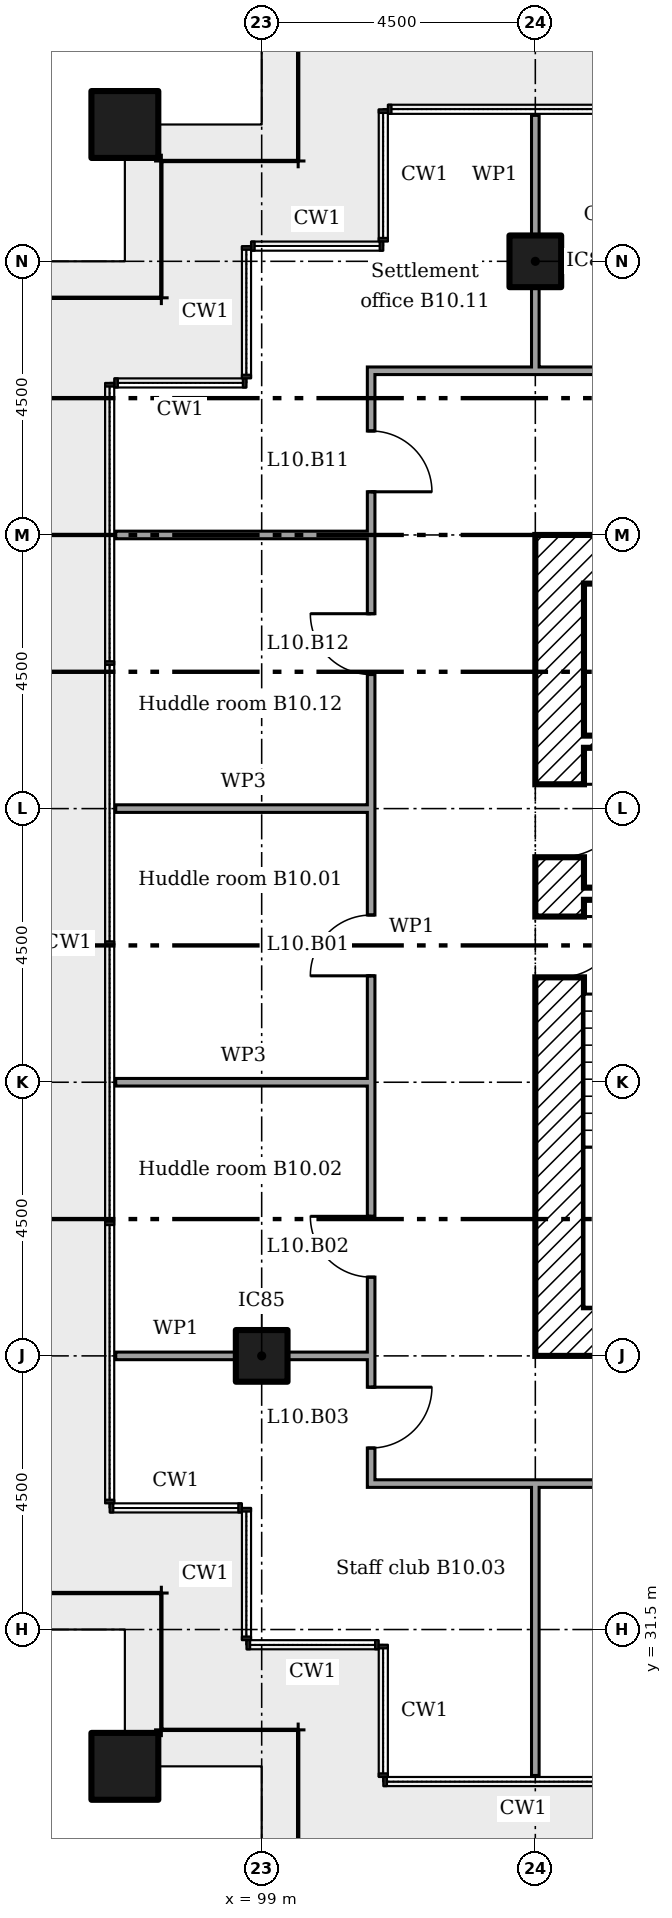
"""IFC4 building model, lengths in metres.
Left out: names, types, materials, properties, quantities, classifications, styles, units other than length and angle.
Written with IfcOpenShell. Run it as: python <this file> out.ifc"""

import sys

from ifc_helpers import new_model, si_unit, direction, frame, frame_2d, origin, origin_2d, place, context, subcontext, project, spatial, rectangle, extrude, element, fill, save


model = new_model("IFC4")
c1 = context("Model", 3, precision=1e-05, world=origin(), true_north=direction((0.0, 1.0)))
c2 = subcontext(c1, "Body", "Model", "MODEL_VIEW")
j1 = project(units=[si_unit("LENGTHUNIT", "METRE"), si_unit("PLANEANGLEUNIT", "RADIAN")], contexts=[c1])
p1 = place(None, origin())
s1 = spatial("IfcSite", under=j1, at=p1, CompositionType="ELEMENT")
p2 = place(p1, origin())
s2 = spatial("IfcBuilding", under=s1, at=p2, CompositionType="ELEMENT")
p3 = place(p2, frame((0.0, 0.0, 47.4)))
s3 = spatial("IfcBuildingStorey", under=s2, at=p3, CompositionType="ELEMENT", Elevation=47.4)
for number, where in (
    (1, (96.75, 56.25, 0.0)),
    (2, (96.75, 29.25, 0.0)),
):
    element("IfcColumn", number, at=place(p3, frame(where)), inside=s3, PredefinedType="COLUMN", context=c2, shape_type="SweptSolid", body=[
        extrude(rectangle(XDim=1.1, YDim=1.1, at=origin_2d()), origin(), (0.0, 0.0, 1.0), 3.6),
    ])
for number, where in (
    (3, (99.0, 36.0, 0.0)),
    (4, (103.5, 54.0, 0.0)),
):
    element("IfcColumn", number, at=place(p3, frame(where)), inside=s3, PredefinedType="COLUMN", context=c2, shape_type="SweptSolid", body=[
        extrude(rectangle(XDim=0.85, YDim=0.85, at=origin_2d()), origin(), (0.0, 0.0, 1.0), 3.6),
    ])
for number, where in (
    (5, (104.3, 49.1, 0.0)),
    (6, (104.3, 36.4, 0.0)),
):
    element("IfcWall", number, at=place(p3, frame(where)), inside=s3, PredefinedType="SHEAR", context=c2, shape_type="SweptSolid", body=[
        extrude(rectangle(XDim=11.9, YDim=0.8, at=frame_2d((5.95, 0.0))), origin(), (0.0, 0.0, 1.0), 3.35),
    ])
p4 = place(p3, frame((103.9, 36.0, 0.0), z_axis=(0.0, 0.0, 1.0), x_axis=(0.0, 1.0, 0.0)))
e7 = element("IfcWall", 7, at=p4, inside=s3, PredefinedType="SHEAR", context=c2, shape_type="SweptSolid", body=[
    extrude(rectangle(XDim=13.5, YDim=0.8, at=frame_2d((6.75, 0.0))), origin(), (0.0, 0.0, 1.0), 3.35),
])
p5 = place(p4, frame((8.2, 0.0, 0.0)))
e8 = element("IfcOpeningElement", 8, at=p5, cuts=e7, PredefinedType="OPENING", context=c2, shape_type="SweptSolid", body=[
    extrude(rectangle(XDim=1.2, YDim=2.1, at=frame_2d((0.6, 1.05))), frame((0.0, 0.41, 0.0), z_axis=(0.0, -1.0, 0.0), x_axis=(1.0, 0.0, 0.0)), (0.0, 0.0, 1.0), 0.82),
])
p6 = place(p4, frame((6.225, 0.0, 0.0)))
e9 = element("IfcOpeningElement", 9, at=p6, cuts=e7, PredefinedType="OPENING", context=c2, shape_type="SweptSolid", body=[
    extrude(rectangle(XDim=1.0, YDim=2.1, at=frame_2d((0.5, 1.05))), frame((0.0, 0.41, 0.0), z_axis=(0.0, -1.0, 0.0), x_axis=(1.0, 0.0, 0.0)), (0.0, 0.0, 1.0), 0.82),
])
p7 = place(p3, frame((104.3, 46.1, 0.0)))
e10 = element("IfcWall", 10, at=p7, inside=s3, PredefinedType="SHEAR", context=c2, shape_type="SweptSolid", body=[
    extrude(rectangle(XDim=3.033, YDim=0.2, at=frame_2d((1.517, 0.0))), origin(), (0.0, 0.0, 1.0), 3.35),
])
p8 = place(p7, frame((1.217, 0.0, 0.0)))
e11 = element("IfcOpeningElement", 11, at=p8, cuts=e10, PredefinedType="OPENING", context=c2, shape_type="SweptSolid", body=[
    extrude(rectangle(XDim=0.9, YDim=2.1, at=frame_2d((0.45, 1.05))), frame((0.0, 0.11, 0.0), z_axis=(0.0, -1.0, 0.0), x_axis=(1.0, 0.0, 0.0)), (0.0, 0.0, 1.0), 0.22),
])
p9 = place(p3, frame((104.3, 43.6, 0.0)))
e12 = element("IfcWall", 12, at=p9, inside=s3, PredefinedType="SHEAR", context=c2, shape_type="SweptSolid", body=[
    extrude(rectangle(XDim=2.7, YDim=0.2, at=frame_2d((1.35, 0.0))), origin(), (0.0, 0.0, 1.0), 3.35),
])
p10 = place(p9, frame((0.95, 0.0, 0.0)))
e13 = element("IfcOpeningElement", 13, at=p10, cuts=e12, PredefinedType="OPENING", context=c2, shape_type="SweptSolid", body=[
    extrude(rectangle(XDim=1.0, YDim=2.1, at=frame_2d((0.5, 1.05))), frame((0.0, 0.11, 0.0), z_axis=(0.0, -1.0, 0.0), x_axis=(1.0, 0.0, 0.0)), (0.0, 0.0, 1.0), 0.22),
])
p11 = place(p3, frame((100.738, 33.9, 0.0)))
e14 = element("IfcWall", 14, at=p11, inside=s3, PredefinedType="PARTITIONING", context=c2, shape_type="SweptSolid", body=[
    extrude(rectangle(XDim=12.575, YDim=0.125, at=frame_2d((6.288, 0.0))), origin(), (0.0, 0.0, 1.0), 3.45),
])
p12 = place(p11, frame((7.137, 0.0, 0.0)))
e15 = element("IfcOpeningElement", 15, at=p12, cuts=e14, PredefinedType="OPENING", context=c2, shape_type="SweptSolid", body=[
    extrude(rectangle(XDim=1.0, YDim=2.1, at=frame_2d((0.5, 1.05))), frame((0.0, 0.073, 0.0), z_axis=(0.0, -1.0, 0.0), x_axis=(1.0, 0.0, 0.0)), (0.0, 0.0, 1.0), 0.145),
])
p13 = place(p3, frame((96.6, 36.0, 0.0)))
e16 = element("IfcWall", 16, at=p13, inside=s3, PredefinedType="PARTITIONING", context=c2, shape_type="SweptSolid", body=[
    extrude(rectangle(XDim=1.975, YDim=0.125, at=frame_2d((0.987, 0.0))), origin(), (0.0, 0.0, 1.0), 2.842),
])
p14 = place(p3, frame((99.425, 36.0, 0.0)))
e17 = element("IfcWall", 17, at=p14, inside=s3, PredefinedType="PARTITIONING", context=c2, shape_type="SweptSolid", body=[
    extrude(rectangle(XDim=1.375, YDim=0.125, at=frame_2d((0.688, 0.0))), origin(), (0.0, 0.0, 1.0), 2.842),
])
for number, where in (
    (18, (96.6, 40.5, 0.0)),
    (19, (96.6, 45.0, 0.0)),
):
    element("IfcWall", number, at=place(p3, frame(where)), inside=s3, PredefinedType="MOVABLE", context=c2, shape_type="SweptSolid", body=[
        extrude(rectangle(XDim=4.2, YDim=0.125, at=frame_2d((2.1, 0.0))), origin(), (0.0, 0.0, 1.0), 2.851),
    ])
p15 = place(p3, frame((96.6, 49.5, 0.0)))
e20 = element("IfcWall", 20, at=p15, inside=s3, PredefinedType="PARTITIONING", context=c2, shape_type="SweptSolid", body=[
    extrude(rectangle(XDim=4.2, YDim=0.125, at=frame_2d((2.1, 0.0))), origin(), (0.0, 0.0, 1.0), 2.851),
])
p16 = place(p3, frame((100.738, 52.2, 0.0)))
e21 = element("IfcWall", 21, at=p16, inside=s3, PredefinedType="PARTITIONING", context=c2, shape_type="SweptSolid", body=[
    extrude(rectangle(XDim=8.075, YDim=0.125, at=frame_2d((4.038, 0.0))), origin(), (0.0, 0.0, 1.0), 3.45),
])
p17 = place(p16, frame((4.887, 0.0, 0.0)))
e22 = element("IfcOpeningElement", 22, at=p17, cuts=e21, PredefinedType="OPENING", context=c2, shape_type="SweptSolid", body=[
    extrude(rectangle(XDim=1.0, YDim=2.1, at=frame_2d((0.5, 1.05))), frame((0.0, 0.073, 0.0), z_axis=(0.0, -1.0, 0.0), x_axis=(1.0, 0.0, 0.0)), (0.0, 0.0, 1.0), 0.145),
])
p18 = place(p3, frame((100.8, 33.962, 0.0), z_axis=(0.0, 0.0, 1.0), x_axis=(0.0, 1.0, 0.0)))
e23 = element("IfcWall", 23, at=p18, inside=s3, PredefinedType="PARTITIONING", context=c2, shape_type="SweptSolid", body=[
    extrude(rectangle(XDim=18.175, YDim=0.125, at=frame_2d((9.087, 0.0))), origin(), (0.0, 0.0, 1.0), 3.45),
])
p19 = place(p18, frame((8.288, 0.0, 0.0)))
e24 = element("IfcOpeningElement", 24, at=p19, cuts=e23, PredefinedType="OPENING", context=c2, shape_type="SweptSolid", body=[
    extrude(rectangle(XDim=1.0, YDim=2.1, at=frame_2d((0.5, 1.05))), frame((0.0, 0.073, 0.0), z_axis=(0.0, -1.0, 0.0), x_axis=(1.0, 0.0, 0.0)), (0.0, 0.0, 1.0), 0.145),
])
p20 = place(p18, frame((3.333, 0.0, 0.0)))
e25 = element("IfcOpeningElement", 25, at=p20, cuts=e23, PredefinedType="OPENING", context=c2, shape_type="SweptSolid", body=[
    extrude(rectangle(XDim=1.0, YDim=2.1, at=frame_2d((0.5, 1.05))), frame((0.0, 0.073, 0.0), z_axis=(0.0, -1.0, 0.0), x_axis=(1.0, 0.0, 0.0)), (0.0, 0.0, 1.0), 0.145),
])
p21 = place(p18, frame((0.522, 0.0, 0.0)))
e26 = element("IfcOpeningElement", 26, at=p21, cuts=e23, PredefinedType="OPENING", context=c2, shape_type="SweptSolid", body=[
    extrude(rectangle(XDim=1.0, YDim=2.1, at=frame_2d((0.5, 1.05))), frame((0.0, 0.073, 0.0), z_axis=(0.0, -1.0, 0.0), x_axis=(1.0, 0.0, 0.0)), (0.0, 0.0, 1.0), 0.145),
])
p22 = place(p18, frame((16.248, 0.0, 0.0)))
e27 = element("IfcOpeningElement", 27, at=p22, cuts=e23, PredefinedType="OPENING", context=c2, shape_type="SweptSolid", body=[
    extrude(rectangle(XDim=1.0, YDim=2.1, at=frame_2d((0.5, 1.05))), frame((0.0, 0.073, 0.0), z_axis=(0.0, -1.0, 0.0), x_axis=(1.0, 0.0, 0.0)), (0.0, 0.0, 1.0), 0.145),
])
p23 = place(p18, frame((13.242, 0.0, 0.0)))
e28 = element("IfcOpeningElement", 28, at=p23, cuts=e23, PredefinedType="OPENING", context=c2, shape_type="SweptSolid", body=[
    extrude(rectangle(XDim=1.0, YDim=2.1, at=frame_2d((0.5, 1.05))), frame((0.0, 0.073, 0.0), z_axis=(0.0, -1.0, 0.0), x_axis=(1.0, 0.0, 0.0)), (0.0, 0.0, 1.0), 0.145),
])
p24 = place(p3, frame((103.5, 29.1, 0.0), z_axis=(0.0, 0.0, 1.0), x_axis=(0.0, 1.0, 0.0)))
e29 = element("IfcWall", 29, at=p24, inside=s3, PredefinedType="PARTITIONING", context=c2, shape_type="SweptSolid", body=[
    extrude(rectangle(XDim=4.8, YDim=0.125, at=frame_2d((2.4, 0.0))), origin(), (0.0, 0.0, 1.0), 2.851),
])
p25 = place(p3, frame((103.5, 52.2, 0.0), z_axis=(0.0, 0.0, 1.0), x_axis=(0.0, 1.0, 0.0)))
e30 = element("IfcWall", 30, at=p25, inside=s3, PredefinedType="PARTITIONING", context=c2, shape_type="SweptSolid", body=[
    extrude(rectangle(XDim=1.375, YDim=0.125, at=frame_2d((0.688, 0.0))), origin(), (0.0, 0.0, 1.0), 2.842),
])
p26 = place(p3, frame((103.5, 54.425, 0.0), z_axis=(0.0, 0.0, 1.0), x_axis=(0.0, 1.0, 0.0)))
e31 = element("IfcWall", 31, at=p26, inside=s3, PredefinedType="PARTITIONING", context=c2, shape_type="SweptSolid", body=[
    extrude(rectangle(XDim=1.975, YDim=0.125, at=frame_2d((0.987, 0.0))), origin(), (0.0, 0.0, 1.0), 2.842),
])
p27 = place(p5, frame((1.2, 0.0, 0.0), x_axis=(-1.0, 0.0, 0.0)))
e32 = element("IfcDoor", 32, at=p27, inside=s3, OperationType="SINGLE_SWING_RIGHT", PredefinedType="DOOR", context=c2, shape_type="SweptSolid", body=[
    extrude(rectangle(XDim=1.2, YDim=2.1, at=frame_2d((0.6, 1.05))), frame((0.0, 0.025, 0.0), z_axis=(0.0, -1.0, 0.0), x_axis=(1.0, 0.0, 0.0)), (0.0, 0.0, 1.0), 0.05),
])
fill(e8, e32)
p28 = place(p6, frame((1.0, 0.0, 0.0), x_axis=(-1.0, 0.0, 0.0)))
e33 = element("IfcDoor", 33, at=p28, inside=s3, OperationType="SINGLE_SWING_RIGHT", PredefinedType="DOOR", context=c2, shape_type="SweptSolid", body=[
    extrude(rectangle(XDim=1.0, YDim=2.1, at=frame_2d((0.5, 1.05))), frame((0.0, 0.025, 0.0), z_axis=(0.0, -1.0, 0.0), x_axis=(1.0, 0.0, 0.0)), (0.0, 0.0, 1.0), 0.05),
])
fill(e9, e33)
p29 = place(p19, origin())
e34 = element("IfcDoor", 34, at=p29, inside=s3, OperationType="SINGLE_SWING_RIGHT", PredefinedType="DOOR", context=c2, shape_type="SweptSolid", body=[
    extrude(rectangle(XDim=1.0, YDim=2.1, at=frame_2d((0.5, 1.05))), frame((0.0, 0.025, 0.0), z_axis=(0.0, -1.0, 0.0), x_axis=(1.0, 0.0, 0.0)), (0.0, 0.0, 1.0), 0.05),
])
fill(e24, e34)
p30 = place(p20, origin())
e35 = element("IfcDoor", 35, at=p30, inside=s3, OperationType="SINGLE_SWING_LEFT", PredefinedType="DOOR", context=c2, shape_type="SweptSolid", body=[
    extrude(rectangle(XDim=1.0, YDim=2.1, at=frame_2d((0.5, 1.05))), frame((0.0, 0.025, 0.0), z_axis=(0.0, -1.0, 0.0), x_axis=(1.0, 0.0, 0.0)), (0.0, 0.0, 1.0), 0.05),
])
fill(e25, e35)
p31 = place(p21, frame((1.0, 0.0, 0.0), x_axis=(-1.0, 0.0, 0.0)))
e36 = element("IfcDoor", 36, at=p31, inside=s3, OperationType="SINGLE_SWING_RIGHT", PredefinedType="DOOR", context=c2, shape_type="SweptSolid", body=[
    extrude(rectangle(XDim=1.0, YDim=2.1, at=frame_2d((0.5, 1.05))), frame((0.0, 0.025, 0.0), z_axis=(0.0, -1.0, 0.0), x_axis=(1.0, 0.0, 0.0)), (0.0, 0.0, 1.0), 0.05),
])
fill(e26, e36)
p32 = place(p22, frame((1.0, 0.0, 0.0), x_axis=(-1.0, 0.0, 0.0)))
e37 = element("IfcDoor", 37, at=p32, inside=s3, OperationType="SINGLE_SWING_LEFT", PredefinedType="DOOR", context=c2, shape_type="SweptSolid", body=[
    extrude(rectangle(XDim=1.0, YDim=2.1, at=frame_2d((0.5, 1.05))), frame((0.0, 0.025, 0.0), z_axis=(0.0, -1.0, 0.0), x_axis=(1.0, 0.0, 0.0)), (0.0, 0.0, 1.0), 0.05),
])
fill(e27, e37)
p33 = place(p23, origin())
e38 = element("IfcDoor", 38, at=p33, inside=s3, OperationType="SINGLE_SWING_LEFT", PredefinedType="DOOR", context=c2, shape_type="SweptSolid", body=[
    extrude(rectangle(XDim=1.0, YDim=2.1, at=frame_2d((0.5, 1.05))), frame((0.0, 0.025, 0.0), z_axis=(0.0, -1.0, 0.0), x_axis=(1.0, 0.0, 0.0)), (0.0, 0.0, 1.0), 0.05),
])
fill(e28, e38)
save(model, sys.argv[1])
